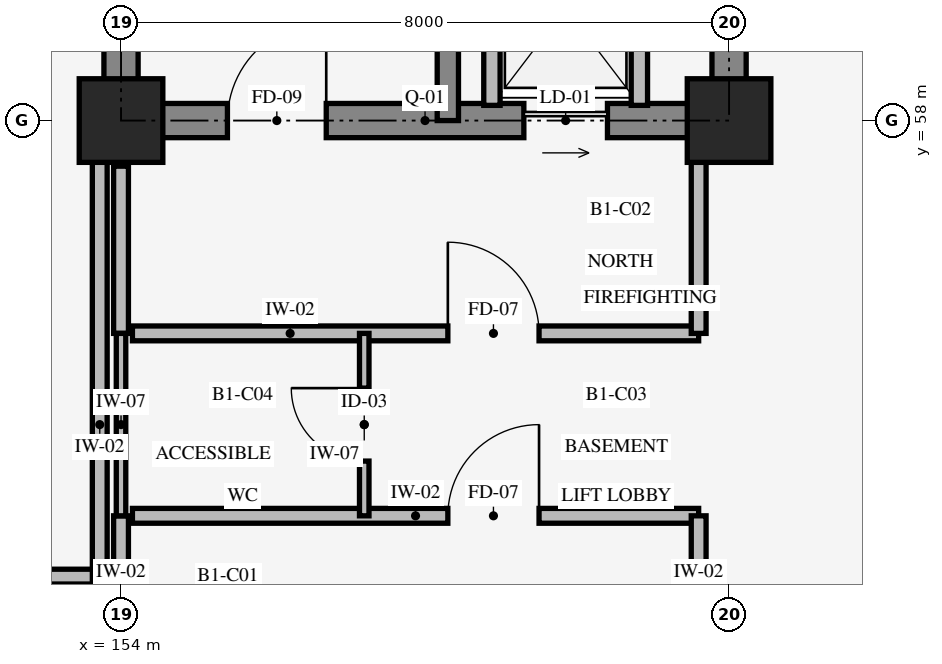
"""IFC4 building model, lengths in metres.
Left out: names, types, materials, properties, quantities, classifications, styles, units other than length and angle.
Written with IfcOpenShell. Run it as: python <this file> out.ifc"""

import sys

from ifc_helpers import new_model, si_unit, direction, frame, frame_2d, origin, origin_2d, place, context, subcontext, project, spatial, rectangle, extrude, element, fill, save


model = new_model("IFC4")
c1 = context("Model", 3, precision=1e-05, world=origin(), true_north=direction((0.0, 1.0)))
c2 = subcontext(c1, "Body", "Model", "MODEL_VIEW")
j1 = project(units=[si_unit("LENGTHUNIT", "METRE"), si_unit("PLANEANGLEUNIT", "RADIAN")], contexts=[c1])
p1 = place(None, origin())
s1 = spatial("IfcSite", under=j1, at=p1, CompositionType="ELEMENT")
p2 = place(p1, origin())
s2 = spatial("IfcBuilding", under=s1, at=p2, CompositionType="ELEMENT")
p3 = place(p2, frame((0.0, 0.0, -4.5)))
s3 = spatial("IfcBuildingStorey", under=s2, at=p3, CompositionType="ELEMENT", Elevation=-4.5)
p4 = place(p3, frame((154.0, 58.0, 0.0), z_axis=(0.0, 0.0, 1.0), x_axis=(1.0, 0.0, 0.0)))
e1 = element("IfcWall", 1, at=p4, inside=s3, PredefinedType="SHEAR", context=c2, shape_type="SweptSolid", body=[
    extrude(rectangle(XDim=8.0, YDim=0.45, at=frame_2d((4.0, 0.0))), origin(), (0.0, 0.0, 1.0), 4.22),
])
p5 = place(p4, frame((1.4, 0.0, 0.0)))
e2 = element("IfcOpeningElement", 2, at=p5, cuts=e1, PredefinedType="OPENING", context=c2, shape_type="SweptSolid", body=[
    extrude(rectangle(XDim=1.3, YDim=2.15, at=frame_2d((0.65, 1.075))), frame((0.0, 0.235, 0.0), z_axis=(0.0, -1.0, 0.0), x_axis=(1.0, 0.0, 0.0)), (0.0, 0.0, 1.0), 0.47),
])
p6 = place(p4, frame((5.3, 0.0, 0.0)))
e3 = element("IfcOpeningElement", 3, at=p6, cuts=e1, PredefinedType="OPENING", context=c2, shape_type="SweptSolid", body=[
    extrude(rectangle(XDim=1.1, YDim=2.2, at=frame_2d((0.55, 1.1))), frame((0.0, 0.235, 0.0), z_axis=(0.0, -1.0, 0.0), x_axis=(1.0, 0.0, 0.0)), (0.0, 0.0, 1.0), 0.47),
])
p7 = place(p3, frame((162.0, 58.0, 0.0), z_axis=(0.0, 0.0, 1.0), x_axis=(0.0, 1.0, 0.0)))
e4 = element("IfcWall", 4, at=p7, inside=s3, PredefinedType="SHEAR", context=c2, shape_type="SweptSolid", body=[
    extrude(rectangle(XDim=8.0, YDim=0.45, at=frame_2d((4.0, 0.0))), origin(), (0.0, 0.0, 1.0), 4.22),
])
p8 = place(p7, frame((3.275, 0.0, 0.0)))
e5 = element("IfcOpeningElement", 5, at=p8, cuts=e4, PredefinedType="OPENING", context=c2, shape_type="SweptSolid", body=[
    extrude(rectangle(XDim=1.05, YDim=2.2, at=frame_2d((0.525, 1.1))), frame((0.0, 0.235, 0.0), z_axis=(0.0, -1.0, 0.0), x_axis=(1.0, 0.0, 0.0)), (0.0, 0.0, 1.0), 0.47),
])
p9 = place(p7, frame((5.45, 0.0, 0.0)))
e6 = element("IfcOpeningElement", 6, at=p9, cuts=e4, PredefinedType="OPENING", context=c2, shape_type="SweptSolid", body=[
    extrude(rectangle(XDim=1.4, YDim=2.3, at=frame_2d((0.7, 1.15))), frame((0.0, 0.235, 0.0), z_axis=(0.0, -1.0, 0.0), x_axis=(1.0, 0.0, 0.0)), (0.0, 0.0, 1.0), 0.47),
])
p10 = place(p3, frame((154.0, 66.0, 0.0), z_axis=(0.0, 0.0, 1.0), x_axis=(0.0, -1.0, 0.0)))
e7 = element("IfcWall", 7, at=p10, inside=s3, PredefinedType="SHEAR", context=c2, shape_type="SweptSolid", body=[
    extrude(rectangle(XDim=8.0, YDim=0.45, at=frame_2d((4.0, 0.0))), origin(), (0.0, 0.0, 1.0), 4.22),
])
p11 = place(p3, frame((158.3, 58.0, 0.0), z_axis=(0.0, 0.0, 1.0), x_axis=(0.0, 1.0, 0.0)))
e8 = element("IfcWall", 8, at=p11, inside=s3, PredefinedType="SHEAR", context=c2, shape_type="SweptSolid", body=[
    extrude(rectangle(XDim=8.0, YDim=0.28, at=frame_2d((4.0, 0.0))), origin(), (0.0, 0.0, 1.0), 4.22),
])
for number, where, z_axis, x_axis in (
    (9, (154.0, 58.0, 0.0), (0.0, 0.0, 1.0), (1.0, 0.0, 0.0)),
    (10, (162.0, 58.0, 0.0), (0.0, 0.0, 1.0), (1.0, 0.0, 0.0)),
):
    element("IfcColumn", number, at=place(p3, frame(where, z_axis=z_axis, x_axis=x_axis)), inside=s3, PredefinedType="COLUMN", context=c2, shape_type="SweptSolid", body=[
        extrude(rectangle(XDim=1.1, YDim=1.1, at=origin_2d()), origin(), (0.0, 0.0, 1.0), 4.5),
    ])
for number, where, z_axis, x_axis in (
    (11, (160.82, 58.2, 0.0), (0.0, 0.0, 1.0), (0.0, 1.0, 0.0)),
    (12, (158.88, 58.2, 0.0), (0.0, 0.0, 1.0), (0.0, 1.0, 0.0)),
):
    element("IfcWall", number, at=place(p3, frame(where, z_axis=z_axis, x_axis=x_axis)), inside=s3, PredefinedType="STANDARD", context=c2, shape_type="SweptSolid", body=[
        extrude(rectangle(XDim=2.55, YDim=0.215, at=frame_2d((1.275, 0.0))), origin(), (0.0, 0.0, 1.0), 4.135),
    ])
p12 = place(p3, frame((154.15, 52.8, 0.0), z_axis=(0.0, 0.0, 1.0), x_axis=(1.0, 0.0, 0.0)))
e13 = element("IfcWall", 13, at=p12, inside=s3, PredefinedType="STANDARD", context=c2, shape_type="SweptSolid", body=[
    extrude(rectangle(XDim=7.45, YDim=0.195, at=frame_2d((3.725, 0.0))), origin(), (0.0, 0.0, 1.0), 4.135),
])
p13 = place(p12, frame((4.15, 0.0, 0.0)))
e14 = element("IfcOpeningElement", 14, at=p13, cuts=e13, PredefinedType="OPENING", context=c2, shape_type="SweptSolid", body=[
    extrude(rectangle(XDim=1.2, YDim=2.1, at=frame_2d((0.6, 1.05))), frame((0.0, 0.107, 0.0), z_axis=(0.0, -1.0, 0.0), x_axis=(1.0, 0.0, 0.0)), (0.0, 0.0, 1.0), 0.215),
])
p14 = place(p3, frame((161.6, 50.15, 0.0), z_axis=(0.0, 0.0, 1.0), x_axis=(0.0, 1.0, 0.0)))
e15 = element("IfcWall", 15, at=p14, inside=s3, PredefinedType="STANDARD", context=c2, shape_type="SweptSolid", body=[
    extrude(rectangle(XDim=2.65, YDim=0.195, at=frame_2d((1.325, 0.0))), origin(), (0.0, 0.0, 1.0), 3.13),
])
p15 = place(p3, frame((154.0, 50.6, 0.0), z_axis=(0.0, 0.0, 1.0), x_axis=(0.0, 1.0, 0.0)))
e16 = element("IfcWall", 16, at=p15, inside=s3, PredefinedType="STANDARD", context=c2, shape_type="SweptSolid", body=[
    extrude(rectangle(XDim=2.2, YDim=0.195, at=frame_2d((1.1, 0.0))), origin(), (0.0, 0.0, 1.0), 3.13),
])
p16 = place(p3, frame((154.15, 55.2, 0.0), z_axis=(0.0, 0.0, 1.0), x_axis=(1.0, 0.0, 0.0)))
e17 = element("IfcWall", 17, at=p16, inside=s3, PredefinedType="STANDARD", context=c2, shape_type="SweptSolid", body=[
    extrude(rectangle(XDim=7.45, YDim=0.195, at=frame_2d((3.725, 0.0))), origin(), (0.0, 0.0, 1.0), 4.135),
])
p17 = place(p16, frame((4.15, 0.0, 0.0)))
e18 = element("IfcOpeningElement", 18, at=p17, cuts=e17, PredefinedType="OPENING", context=c2, shape_type="SweptSolid", body=[
    extrude(rectangle(XDim=1.2, YDim=2.1, at=frame_2d((0.6, 1.05))), frame((0.0, 0.107, 0.0), z_axis=(0.0, -1.0, 0.0), x_axis=(1.0, 0.0, 0.0)), (0.0, 0.0, 1.0), 0.215),
])
p18 = place(p3, frame((161.6, 55.2, 0.0), z_axis=(0.0, 0.0, 1.0), x_axis=(0.0, 1.0, 0.0)))
e19 = element("IfcWall", 19, at=p18, inside=s3, PredefinedType="STANDARD", context=c2, shape_type="SweptSolid", body=[
    extrude(rectangle(XDim=2.65, YDim=0.195, at=frame_2d((1.325, 0.0))), origin(), (0.0, 0.0, 1.0), 3.13),
])
p19 = place(p3, frame((154.0, 55.2, 0.0), z_axis=(0.0, 0.0, 1.0), x_axis=(0.0, 1.0, 0.0)))
e20 = element("IfcWall", 20, at=p19, inside=s3, PredefinedType="STANDARD", context=c2, shape_type="SweptSolid", body=[
    extrude(rectangle(XDim=2.2, YDim=0.195, at=frame_2d((1.1, 0.0))), origin(), (0.0, 0.0, 1.0), 3.13),
])
p20 = place(p3, frame((154.0, 52.8, 0.0), z_axis=(0.0, 0.0, 1.0), x_axis=(0.0, 1.0, 0.0)))
e21 = element("IfcWall", 21, at=p20, inside=s3, PredefinedType="STANDARD", context=c2, shape_type="SweptSolid", body=[
    extrude(rectangle(XDim=2.4, YDim=0.125, at=frame_2d((1.2, 0.0))), origin(), (0.0, 0.0, 1.0), 3.13),
])
p21 = place(p3, frame((157.2, 52.8, 0.0), z_axis=(0.0, 0.0, 1.0), x_axis=(0.0, 1.0, 0.0)))
e22 = element("IfcWall", 22, at=p21, inside=s3, PredefinedType="STANDARD", context=c2, shape_type="SweptSolid", body=[
    extrude(rectangle(XDim=2.4, YDim=0.125, at=frame_2d((1.2, 0.0))), origin(), (0.0, 0.0, 1.0), 4.135),
])
p22 = place(p21, frame((0.72, 0.0, 0.0)))
e23 = element("IfcOpeningElement", 23, at=p22, cuts=e22, PredefinedType="OPENING", context=c2, shape_type="SweptSolid", body=[
    extrude(rectangle(XDim=0.96, YDim=2.08, at=frame_2d((0.48, 1.04))), frame((0.0, 0.073, 0.0), z_axis=(0.0, -1.0, 0.0), x_axis=(1.0, 0.0, 0.0)), (0.0, 0.0, 1.0), 0.145),
])
p23 = place(p3, frame((137.4, 52.0, 0.0), z_axis=(0.0, 0.0, 1.0), x_axis=(1.0, 0.0, 0.0)))
e24 = element("IfcWall", 24, at=p23, inside=s3, PredefinedType="STANDARD", context=c2, shape_type="SweptSolid", body=[
    extrude(rectangle(XDim=16.45, YDim=0.195, at=frame_2d((8.225, 0.0))), origin(), (0.0, 0.0, 1.0), 4.135),
])
p24 = place(p3, frame((153.72, 50.0, 0.0), z_axis=(0.0, 0.0, 1.0), x_axis=(0.0, 1.0, 0.0)))
e25 = element("IfcWall", 25, at=p24, inside=s3, PredefinedType="STANDARD", context=c2, shape_type="SweptSolid", body=[
    extrude(rectangle(XDim=8.0, YDim=0.195, at=frame_2d((4.0, 0.0))), origin(), (0.0, 0.0, 1.0), 3.13),
])
p25 = place(p5, origin())
e26 = element("IfcDoor", 26, at=p25, inside=s3, OperationType="SINGLE_SWING_RIGHT", PredefinedType="DOOR", context=c2, shape_type="SweptSolid", body=[
    extrude(rectangle(XDim=1.3, YDim=2.15, at=frame_2d((0.65, 1.075))), frame((0.0, 0.025, 0.0), z_axis=(0.0, -1.0, 0.0), x_axis=(1.0, 0.0, 0.0)), (0.0, 0.0, 1.0), 0.05),
])
fill(e2, e26)
p26 = place(p6, origin())
e27 = element("IfcDoor", 27, at=p26, inside=s3, OperationType="SLIDING_TO_RIGHT", PredefinedType="DOOR", context=c2, shape_type="SweptSolid", body=[
    extrude(rectangle(XDim=1.1, YDim=2.2, at=frame_2d((0.55, 1.1))), frame((0.0, 0.025, 0.0), z_axis=(0.0, -1.0, 0.0), x_axis=(1.0, 0.0, 0.0)), (0.0, 0.0, 1.0), 0.05),
])
fill(e3, e27)
p27 = place(p13, origin())
e28 = element("IfcDoor", 28, at=p27, inside=s3, OperationType="SINGLE_SWING_RIGHT", PredefinedType="DOOR", context=c2, shape_type="SweptSolid", body=[
    extrude(rectangle(XDim=1.2, YDim=2.1, at=frame_2d((0.6, 1.05))), frame((0.0, 0.025, 0.0), z_axis=(0.0, -1.0, 0.0), x_axis=(1.0, 0.0, 0.0)), (0.0, 0.0, 1.0), 0.05),
])
fill(e14, e28)
p28 = place(p17, origin())
e29 = element("IfcDoor", 29, at=p28, inside=s3, OperationType="SINGLE_SWING_LEFT", PredefinedType="DOOR", context=c2, shape_type="SweptSolid", body=[
    extrude(rectangle(XDim=1.2, YDim=2.1, at=frame_2d((0.6, 1.05))), frame((0.0, 0.025, 0.0), z_axis=(0.0, -1.0, 0.0), x_axis=(1.0, 0.0, 0.0)), (0.0, 0.0, 1.0), 0.05),
])
fill(e18, e29)
p29 = place(p22, origin())
e30 = element("IfcDoor", 30, at=p29, inside=s3, OperationType="SINGLE_SWING_RIGHT", PredefinedType="DOOR", context=c2, shape_type="SweptSolid", body=[
    extrude(rectangle(XDim=0.96, YDim=2.08, at=frame_2d((0.48, 1.04))), frame((0.0, 0.025, 0.0), z_axis=(0.0, -1.0, 0.0), x_axis=(1.0, 0.0, 0.0)), (0.0, 0.0, 1.0), 0.05),
])
fill(e23, e30)
save(model, sys.argv[1])
